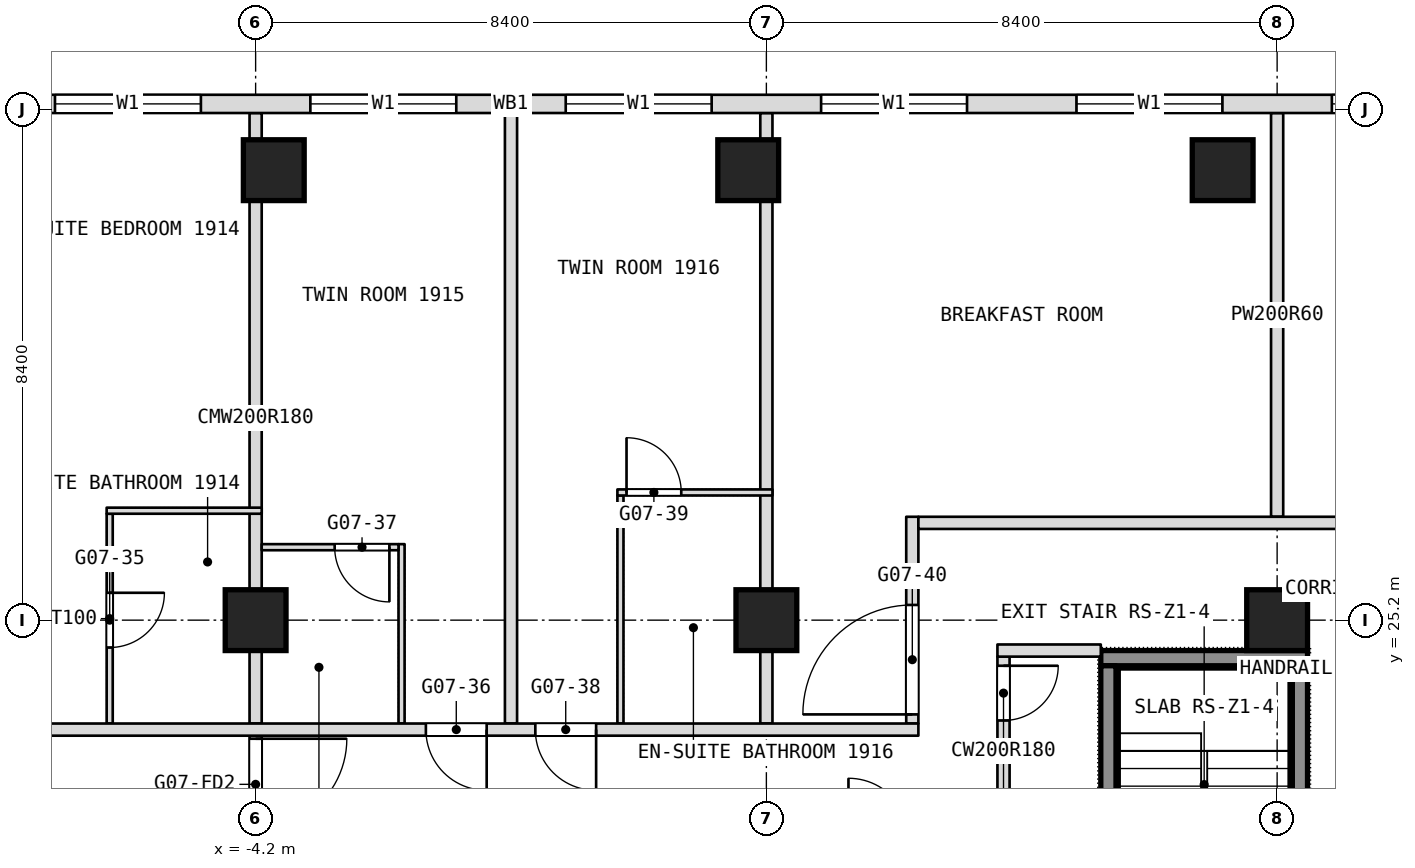
"""IFC4 building model, lengths in metres.
Left out: names, types, materials, properties, quantities, classifications, styles, units other than length and angle.
Written with IfcOpenShell. Run it as: python <this file> out.ifc"""

import sys

from ifc_helpers import new_model, si_unit, direction, frame, frame_2d, origin, origin_2d, place, context, subcontext, project, spatial, rectangle, extrude, element, fill, save


model = new_model("IFC4")
c1 = context("Model", 3, precision=1e-05, world=origin(), true_north=direction((0.0, 1.0)))
c2 = subcontext(c1, "Body", "Model", "MODEL_VIEW")
j1 = project(units=[si_unit("LENGTHUNIT", "METRE"), si_unit("PLANEANGLEUNIT", "RADIAN")], contexts=[c1])
p1 = place(None, origin())
s1 = spatial("IfcSite", under=j1, at=p1, CompositionType="ELEMENT")
p2 = place(p1, origin())
s2 = spatial("IfcBuilding", under=s1, at=p2, CompositionType="ELEMENT")
p3 = place(p2, frame((0.0, 0.0, 83.3)))
s3 = spatial("IfcBuildingStorey", under=s2, at=p3, CompositionType="ELEMENT", Elevation=83.3)
for number, where, z_axis, x_axis in (
    (1, (-4.2, 25.2, 0.0), (0.0, 0.0, 1.0), (1.0, 0.0, 0.0)),
    (2, (4.2, 25.2, 0.0), (0.0, 0.0, 1.0), (1.0, 0.0, 0.0)),
    (3, (12.6, 25.2, 0.0), (0.0, 0.0, 1.0), (1.0, 0.0, 0.0)),
    (4, (-3.901, 32.6, 0.0), (0.0, 0.0, 1.0), (1.0, 0.0, 0.0)),
    (5, (3.901, 32.6, 0.0), (0.0, 0.0, 1.0), (1.0, 0.0, 0.0)),
    (6, (11.704, 32.6, 0.0), (0.0, 0.0, 1.0), (1.0, 0.0, 0.0)),
):
    element("IfcColumn", number, at=place(p3, frame(where, z_axis=z_axis, x_axis=x_axis)), inside=s3, PredefinedType="COLUMN", context=c2, shape_type="SweptSolid", body=[
        extrude(rectangle(XDim=1.0, YDim=1.0, at=origin_2d()), origin(), (0.0, 0.0, 1.0), 3.6),
    ])
p4 = place(p3, frame((12.6, 26.9, 0.0), z_axis=(0.0, 0.0, 1.0), x_axis=(0.0, 1.0, 0.0)))
e7 = element("IfcWall", 7, at=p4, inside=s3, PredefinedType="PARTITIONING", context=c2, shape_type="SweptSolid", body=[
    extrude(rectangle(XDim=6.64, YDim=0.2, at=frame_2d((3.32, 0.0))), origin(), (0.0, 0.0, 1.0), 3.3),
])
p5 = place(p3, frame((8.1, 21.5, 0.0), z_axis=(0.0, 0.0, 1.0), x_axis=(0.0, 1.0, 0.0)))
e8 = element("IfcWall", 8, at=p5, inside=s3, PredefinedType="PARTITIONING", context=c2, shape_type="SweptSolid", body=[
    extrude(rectangle(XDim=3.1, YDim=0.2, at=frame_2d((1.55, 0.0))), origin(), (0.0, 0.0, 1.0), 3.3),
])
p6 = place(p5, frame((2.05, 0.0, 0.0)))
e9 = element("IfcOpeningElement", 9, at=p6, cuts=e8, PredefinedType="OPENING", context=c2, shape_type="SweptSolid", body=[
    extrude(rectangle(XDim=0.9, YDim=2.1, at=frame_2d((0.45, 1.05))), frame((0.0, 0.1, 0.0), z_axis=(0.0, -1.0, 0.0), x_axis=(1.0, 0.0, 0.0)), (0.0, 0.0, 1.0), 0.2),
])
p7 = place(p3, frame((6.6, 23.5, 0.0), z_axis=(0.0, 0.0, 1.0), x_axis=(0.0, 1.0, 0.0)))
e10 = element("IfcWall", 10, at=p7, inside=s3, PredefinedType="PARTITIONING", context=c2, shape_type="SweptSolid", body=[
    extrude(rectangle(XDim=3.4, YDim=0.2, at=frame_2d((1.7, 0.0))), origin(), (0.0, 0.0, 1.0), 3.3),
])
p8 = place(p7, frame((0.15, 0.0, 0.0)))
e11 = element("IfcOpeningElement", 11, at=p8, cuts=e10, PredefinedType="OPENING", context=c2, shape_type="SweptSolid", body=[
    extrude(rectangle(XDim=1.8, YDim=2.1, at=frame_2d((0.9, 1.05))), frame((0.0, 0.1, 0.0), z_axis=(0.0, -1.0, 0.0), x_axis=(1.0, 0.0, 0.0)), (0.0, 0.0, 1.0), 0.2),
])
p9 = place(p3, frame((4.2, 23.5, 0.0), z_axis=(0.0, 0.0, 1.0), x_axis=(0.0, 1.0, 0.0)))
e12 = element("IfcWall", 12, at=p9, inside=s3, PredefinedType="PARTITIONING", context=c2, shape_type="SweptSolid", body=[
    extrude(rectangle(XDim=10.04, YDim=0.2, at=frame_2d((5.02, 0.0))), origin(), (0.0, 0.0, 1.0), 3.3),
])
p10 = place(p3, frame((1.8, 23.5, 0.0), z_axis=(0.0, 0.0, 1.0), x_axis=(0.0, 1.0, 0.0)))
e13 = element("IfcWall", 13, at=p10, inside=s3, PredefinedType="PARTITIONING", context=c2, shape_type="SweptSolid", body=[
    extrude(rectangle(XDim=3.75, YDim=0.1, at=frame_2d((1.875, 0.0))), origin(), (0.0, 0.0, 1.0), 3.3),
])
p11 = place(p3, frame((0.0, 23.5, 0.0), z_axis=(0.0, 0.0, 1.0), x_axis=(0.0, 1.0, 0.0)))
e14 = element("IfcWall", 14, at=p11, inside=s3, PredefinedType="PARTITIONING", context=c2, shape_type="SweptSolid", body=[
    extrude(rectangle(XDim=10.04, YDim=0.2, at=frame_2d((5.02, 0.0))), origin(), (0.0, 0.0, 1.0), 3.3),
])
p12 = place(p3, frame((-1.8, 23.5, 0.0), z_axis=(0.0, 0.0, 1.0), x_axis=(0.0, 1.0, 0.0)))
e15 = element("IfcWall", 15, at=p12, inside=s3, PredefinedType="PARTITIONING", context=c2, shape_type="SweptSolid", body=[
    extrude(rectangle(XDim=2.95, YDim=0.1, at=frame_2d((1.475, 0.0))), origin(), (0.0, 0.0, 1.0), 3.3),
])
p13 = place(p3, frame((-4.2, 16.8, 0.0), z_axis=(0.0, 0.0, 1.0), x_axis=(0.0, 1.0, 0.0)))
e16 = element("IfcWall", 16, at=p13, inside=s3, PredefinedType="PARTITIONING", context=c2, shape_type="SweptSolid", body=[
    extrude(rectangle(XDim=6.7, YDim=0.2, at=frame_2d((3.35, 0.0))), origin(), (0.0, 0.0, 1.0), 3.3),
])
p14 = place(p13, frame((0.15, 0.0, 0.0)))
e17 = element("IfcOpeningElement", 17, at=p14, cuts=e16, PredefinedType="OPENING", context=c2, shape_type="SweptSolid", body=[
    extrude(rectangle(XDim=1.5, YDim=2.1, at=frame_2d((0.75, 1.05))), frame((0.0, 0.1, 0.0), z_axis=(0.0, -1.0, 0.0), x_axis=(1.0, 0.0, 0.0)), (0.0, 0.0, 1.0), 0.2),
])
p15 = place(p13, frame((4.95, 0.0, 0.0)))
e18 = element("IfcOpeningElement", 18, at=p15, cuts=e16, PredefinedType="OPENING", context=c2, shape_type="SweptSolid", body=[
    extrude(rectangle(XDim=1.5, YDim=2.1, at=frame_2d((0.75, 1.05))), frame((0.0, 0.1, 0.0), z_axis=(0.0, -1.0, 0.0), x_axis=(1.0, 0.0, 0.0)), (0.0, 0.0, 1.0), 0.2),
])
p16 = place(p3, frame((-4.2, 23.5, 0.0), z_axis=(0.0, 0.0, 1.0), x_axis=(0.0, 1.0, 0.0)))
e19 = element("IfcWall", 19, at=p16, inside=s3, PredefinedType="PARTITIONING", context=c2, shape_type="SweptSolid", body=[
    extrude(rectangle(XDim=10.04, YDim=0.2, at=frame_2d((5.02, 0.0))), origin(), (0.0, 0.0, 1.0), 3.3),
])
p17 = place(p3, frame((-6.6, 23.5, 0.0), z_axis=(0.0, 0.0, 1.0), x_axis=(0.0, 1.0, 0.0)))
e20 = element("IfcWall", 20, at=p17, inside=s3, PredefinedType="PARTITIONING", context=c2, shape_type="SweptSolid", body=[
    extrude(rectangle(XDim=3.45, YDim=0.1, at=frame_2d((1.725, 0.0))), origin(), (0.0, 0.0, 1.0), 3.3),
])
p18 = place(p17, frame((1.25, 0.0, 0.0)))
e21 = element("IfcOpeningElement", 21, at=p18, cuts=e20, PredefinedType="OPENING", context=c2, shape_type="SweptSolid", body=[
    extrude(rectangle(XDim=0.9, YDim=2.1, at=frame_2d((0.45, 1.05))), frame((0.0, 0.05, 0.0), z_axis=(0.0, -1.0, 0.0), x_axis=(1.0, 0.0, 0.0)), (0.0, 0.0, 1.0), 0.1),
])
p19 = place(p3, frame((-16.7, 23.4, 0.0), z_axis=(0.0, 0.0, 1.0), x_axis=(1.0, 0.0, 0.0)))
e22 = element("IfcWall", 22, at=p19, inside=s3, PredefinedType="PARTITIONING", context=c2, shape_type="SweptSolid", body=[
    extrude(rectangle(XDim=23.4, YDim=0.2, at=frame_2d((11.7, 0.0))), origin(), (0.0, 0.0, 1.0), 3.3),
])
p20 = place(p19, frame((2.4, 0.0, 0.0)))
e23 = element("IfcOpeningElement", 23, at=p20, cuts=e22, PredefinedType="OPENING", context=c2, shape_type="SweptSolid", body=[
    extrude(rectangle(XDim=0.9, YDim=2.1, at=frame_2d((0.45, 1.05))), frame((0.0, 0.1, 0.0), z_axis=(0.0, -1.0, 0.0), x_axis=(1.0, 0.0, 0.0)), (0.0, 0.0, 1.0), 0.2),
])
p21 = place(p19, frame((5.65, 0.0, 0.0)))
e24 = element("IfcOpeningElement", 24, at=p21, cuts=e22, PredefinedType="OPENING", context=c2, shape_type="SweptSolid", body=[
    extrude(rectangle(XDim=1.1, YDim=2.1, at=frame_2d((0.55, 1.05))), frame((0.0, 0.1, 0.0), z_axis=(0.0, -1.0, 0.0), x_axis=(1.0, 0.0, 0.0)), (0.0, 0.0, 1.0), 0.2),
])
p22 = place(p19, frame((15.3, 0.0, 0.0)))
e25 = element("IfcOpeningElement", 25, at=p22, cuts=e22, PredefinedType="OPENING", context=c2, shape_type="SweptSolid", body=[
    extrude(rectangle(XDim=1.0, YDim=2.1, at=frame_2d((0.5, 1.05))), frame((0.0, 0.1, 0.0), z_axis=(0.0, -1.0, 0.0), x_axis=(1.0, 0.0, 0.0)), (0.0, 0.0, 1.0), 0.2),
])
p23 = place(p19, frame((17.1, 0.0, 0.0)))
e26 = element("IfcOpeningElement", 26, at=p23, cuts=e22, PredefinedType="OPENING", context=c2, shape_type="SweptSolid", body=[
    extrude(rectangle(XDim=1.0, YDim=2.1, at=frame_2d((0.5, 1.05))), frame((0.0, 0.1, 0.0), z_axis=(0.0, -1.0, 0.0), x_axis=(1.0, 0.0, 0.0)), (0.0, 0.0, 1.0), 0.2),
])
p24 = place(p3, frame((8.0, 24.7, 0.0), z_axis=(0.0, 0.0, 1.0), x_axis=(1.0, 0.0, 0.0)))
e27 = element("IfcWall", 27, at=p24, inside=s3, PredefinedType="PARTITIONING", context=c2, shape_type="SweptSolid", body=[
    extrude(rectangle(XDim=1.7, YDim=0.2, at=frame_2d((0.85, 0.0))), origin(), (0.0, 0.0, 1.0), 3.3),
])
p25 = place(p3, frame((-4.1, 26.4, 0.0), z_axis=(0.0, 0.0, 1.0), x_axis=(1.0, 0.0, 0.0)))
e28 = element("IfcWall", 28, at=p25, inside=s3, PredefinedType="PARTITIONING", context=c2, shape_type="SweptSolid", body=[
    extrude(rectangle(XDim=2.25, YDim=0.1, at=frame_2d((1.125, 0.0))), origin(), (0.0, 0.0, 1.0), 3.3),
])
p26 = place(p25, frame((1.2, 0.0, 0.0)))
e29 = element("IfcOpeningElement", 29, at=p26, cuts=e28, PredefinedType="OPENING", context=c2, shape_type="SweptSolid", body=[
    extrude(rectangle(XDim=0.9, YDim=2.1, at=frame_2d((0.45, 1.05))), frame((0.0, 0.05, 0.0), z_axis=(0.0, -1.0, 0.0), x_axis=(1.0, 0.0, 0.0)), (0.0, 0.0, 1.0), 0.1),
])
p27 = place(p3, frame((6.7, 26.8, 0.0), z_axis=(0.0, 0.0, 1.0), x_axis=(1.0, 0.0, 0.0)))
e30 = element("IfcWall", 30, at=p27, inside=s3, PredefinedType="PARTITIONING", context=c2, shape_type="SweptSolid", body=[
    extrude(rectangle(XDim=8.0, YDim=0.2, at=frame_2d((4.0, 0.0))), origin(), (0.0, 0.0, 1.0), 3.3),
])
p28 = place(p3, frame((-6.65, 27.0, 0.0), z_axis=(0.0, 0.0, 1.0), x_axis=(1.0, 0.0, 0.0)))
e31 = element("IfcWall", 31, at=p28, inside=s3, PredefinedType="PARTITIONING", context=c2, shape_type="SweptSolid", body=[
    extrude(rectangle(XDim=2.55, YDim=0.1, at=frame_2d((1.275, 0.0))), origin(), (0.0, 0.0, 1.0), 3.3),
])
p29 = place(p3, frame((1.75, 27.3, 0.0), z_axis=(0.0, 0.0, 1.0), x_axis=(1.0, 0.0, 0.0)))
e32 = element("IfcWall", 32, at=p29, inside=s3, PredefinedType="PARTITIONING", context=c2, shape_type="SweptSolid", body=[
    extrude(rectangle(XDim=2.55, YDim=0.1, at=frame_2d((1.275, 0.0))), origin(), (0.0, 0.0, 1.0), 3.3),
])
p30 = place(p29, frame((0.15, 0.0, 0.0)))
e33 = element("IfcOpeningElement", 33, at=p30, cuts=e32, PredefinedType="OPENING", context=c2, shape_type="SweptSolid", body=[
    extrude(rectangle(XDim=0.9, YDim=2.1, at=frame_2d((0.45, 1.05))), frame((0.0, 0.05, 0.0), z_axis=(0.0, -1.0, 0.0), x_axis=(1.0, 0.0, 0.0)), (0.0, 0.0, 1.0), 0.1),
])
p31 = place(p3, frame((23.406, 33.69, 0.0), z_axis=(0.0, 0.0, 1.0), x_axis=(-1.0, 0.0, 0.0)))
e34 = element("IfcWall", 34, at=p31, inside=s3, PredefinedType="NOTDEFINED", context=c2, shape_type="SweptSolid", body=[
    extrude(rectangle(XDim=46.812, YDim=0.3, at=frame_2d((23.406, 0.0))), origin(), (0.0, 0.0, 1.0), 3.6),
])
p32 = place(p31, frame((2.186, 0.0, 0.9)))
e35 = element("IfcOpeningElement", 35, at=p32, cuts=e34, PredefinedType="OPENING", context=c2, shape_type="SweptSolid", body=[
    extrude(rectangle(XDim=2.4, YDim=2.1, at=frame_2d((1.2, 1.05))), frame((0.0, 0.15, 0.0), z_axis=(0.0, -1.0, 0.0), x_axis=(1.0, 0.0, 0.0)), (0.0, 0.0, 1.0), 0.3),
])
p33 = place(p31, frame((7.506, 0.0, 0.9)))
e36 = element("IfcOpeningElement", 36, at=p33, cuts=e34, PredefinedType="OPENING", context=c2, shape_type="SweptSolid", body=[
    extrude(rectangle(XDim=2.4, YDim=2.1, at=frame_2d((1.2, 1.05))), frame((0.0, 0.15, 0.0), z_axis=(0.0, -1.0, 0.0), x_axis=(1.0, 0.0, 0.0)), (0.0, 0.0, 1.0), 0.3),
])
p34 = place(p31, frame((11.706, 0.0, 0.9)))
e37 = element("IfcOpeningElement", 37, at=p34, cuts=e34, PredefinedType="OPENING", context=c2, shape_type="SweptSolid", body=[
    extrude(rectangle(XDim=2.4, YDim=2.1, at=frame_2d((1.2, 1.05))), frame((0.0, 0.15, 0.0), z_axis=(0.0, -1.0, 0.0), x_axis=(1.0, 0.0, 0.0)), (0.0, 0.0, 1.0), 0.3),
])
p35 = place(p31, frame((15.906, 0.0, 0.9)))
e38 = element("IfcOpeningElement", 38, at=p35, cuts=e34, PredefinedType="OPENING", context=c2, shape_type="SweptSolid", body=[
    extrude(rectangle(XDim=2.4, YDim=2.1, at=frame_2d((1.2, 1.05))), frame((0.0, 0.15, 0.0), z_axis=(0.0, -1.0, 0.0), x_axis=(1.0, 0.0, 0.0)), (0.0, 0.0, 1.0), 0.3),
])
p36 = place(p31, frame((20.106, 0.0, 0.9)))
e39 = element("IfcOpeningElement", 39, at=p36, cuts=e34, PredefinedType="OPENING", context=c2, shape_type="SweptSolid", body=[
    extrude(rectangle(XDim=2.4, YDim=2.1, at=frame_2d((1.2, 1.05))), frame((0.0, 0.15, 0.0), z_axis=(0.0, -1.0, 0.0), x_axis=(1.0, 0.0, 0.0)), (0.0, 0.0, 1.0), 0.3),
])
p37 = place(p31, frame((24.306, 0.0, 0.9)))
e40 = element("IfcOpeningElement", 40, at=p37, cuts=e34, PredefinedType="OPENING", context=c2, shape_type="SweptSolid", body=[
    extrude(rectangle(XDim=2.4, YDim=2.1, at=frame_2d((1.2, 1.05))), frame((0.0, 0.15, 0.0), z_axis=(0.0, -1.0, 0.0), x_axis=(1.0, 0.0, 0.0)), (0.0, 0.0, 1.0), 0.3),
])
p38 = place(p31, frame((28.506, 0.0, 0.9)))
e41 = element("IfcOpeningElement", 41, at=p38, cuts=e34, PredefinedType="OPENING", context=c2, shape_type="SweptSolid", body=[
    extrude(rectangle(XDim=2.4, YDim=2.1, at=frame_2d((1.2, 1.05))), frame((0.0, 0.15, 0.0), z_axis=(0.0, -1.0, 0.0), x_axis=(1.0, 0.0, 0.0)), (0.0, 0.0, 1.0), 0.3),
])
p39 = place(p31, frame((32.706, 0.0, 0.9)))
e42 = element("IfcOpeningElement", 42, at=p39, cuts=e34, PredefinedType="OPENING", context=c2, shape_type="SweptSolid", body=[
    extrude(rectangle(XDim=2.4, YDim=2.1, at=frame_2d((1.2, 1.05))), frame((0.0, 0.15, 0.0), z_axis=(0.0, -1.0, 0.0), x_axis=(1.0, 0.0, 0.0)), (0.0, 0.0, 1.0), 0.3),
])
p40 = place(p31, frame((36.906, 0.0, 0.9)))
e43 = element("IfcOpeningElement", 43, at=p40, cuts=e34, PredefinedType="OPENING", context=c2, shape_type="SweptSolid", body=[
    extrude(rectangle(XDim=2.4, YDim=2.1, at=frame_2d((1.2, 1.05))), frame((0.0, 0.15, 0.0), z_axis=(0.0, -1.0, 0.0), x_axis=(1.0, 0.0, 0.0)), (0.0, 0.0, 1.0), 0.3),
])
p41 = place(p31, frame((42.226, 0.0, 0.9)))
e44 = element("IfcOpeningElement", 44, at=p41, cuts=e34, PredefinedType="OPENING", context=c2, shape_type="SweptSolid", body=[
    extrude(rectangle(XDim=2.4, YDim=2.1, at=frame_2d((1.2, 1.05))), frame((0.0, 0.15, 0.0), z_axis=(0.0, -1.0, 0.0), x_axis=(1.0, 0.0, 0.0)), (0.0, 0.0, 1.0), 0.3),
])
p42 = place(p3, frame((9.7, 24.575, 0.1), z_axis=(0.0, 0.0, 1.0), x_axis=(1.0, 0.0, 0.0)))
e45 = element("IfcWall", 45, at=p42, inside=s3, PredefinedType="SHEAR", context=c2, shape_type="SweptSolid", body=[
    extrude(rectangle(XDim=3.4, YDim=0.25, at=frame_2d((1.7, 0.0))), origin(), (0.0, 0.0, 1.0), 3.6),
])
p43 = place(p3, frame((9.825, 18.75, 0.1), z_axis=(0.0, 0.0, 1.0), x_axis=(0.0, 1.0, 0.0)))
e46 = element("IfcWall", 46, at=p43, inside=s3, PredefinedType="SHEAR", context=c2, shape_type="SweptSolid", body=[
    extrude(rectangle(XDim=5.7, YDim=0.25, at=frame_2d((2.85, 0.0))), origin(), (0.0, 0.0, 1.0), 3.6),
])
p44 = place(p43, frame((0.2, 0.0, 0.0)))
e47 = element("IfcOpeningElement", 47, at=p44, cuts=e46, PredefinedType="OPENING", context=c2, shape_type="SweptSolid", body=[
    extrude(rectangle(XDim=1.0, YDim=2.1, at=frame_2d((0.5, 1.05))), frame((0.0, 0.125, 0.0), z_axis=(0.0, -1.0, 0.0), x_axis=(1.0, 0.0, 0.0)), (0.0, 0.0, 1.0), 0.25),
])
p45 = place(p3, frame((12.975, 18.75, 0.1), z_axis=(0.0, 0.0, 1.0), x_axis=(0.0, 1.0, 0.0)))
e48 = element("IfcWall", 48, at=p45, inside=s3, PredefinedType="SHEAR", context=c2, shape_type="SweptSolid", body=[
    extrude(rectangle(XDim=5.7, YDim=0.25, at=frame_2d((2.85, 0.0))), origin(), (0.0, 0.0, 1.0), 3.6),
])
p46 = place(p6, origin())
e49 = element("IfcDoor", 49, at=p46, inside=s3, OperationType="SINGLE_SWING_LEFT", PredefinedType="DOOR", context=c2, shape_type="SweptSolid", body=[
    extrude(rectangle(XDim=0.9, YDim=2.1, at=frame_2d((0.45, 1.05))), frame((0.0, 0.025, 0.0), z_axis=(0.0, -1.0, 0.0), x_axis=(1.0, 0.0, 0.0)), (0.0, 0.0, 1.0), 0.05),
])
fill(e9, e49)
p47 = place(p8, origin())
e50 = element("IfcDoor", 50, at=p47, inside=s3, OperationType="DOUBLE_DOOR_SINGLE_SWING", PredefinedType="DOOR", context=c2, shape_type="SweptSolid", body=[
    extrude(rectangle(XDim=1.8, YDim=2.1, at=frame_2d((0.9, 1.05))), frame((0.0, 0.025, 0.0), z_axis=(0.0, -1.0, 0.0), x_axis=(1.0, 0.0, 0.0)), (0.0, 0.0, 1.0), 0.05),
])
fill(e11, e50)
p48 = place(p18, origin())
e51 = element("IfcDoor", 51, at=p48, inside=s3, OperationType="SINGLE_SWING_RIGHT", PredefinedType="DOOR", context=c2, shape_type="SweptSolid", body=[
    extrude(rectangle(XDim=0.9, YDim=2.1, at=frame_2d((0.45, 1.05))), frame((0.0, 0.025, 0.0), z_axis=(0.0, -1.0, 0.0), x_axis=(1.0, 0.0, 0.0)), (0.0, 0.0, 1.0), 0.05),
])
fill(e21, e51)
p49 = place(p22, origin())
e52 = element("IfcDoor", 52, at=p49, inside=s3, OperationType="SINGLE_SWING_LEFT", PredefinedType="DOOR", context=c2, shape_type="SweptSolid", body=[
    extrude(rectangle(XDim=1.0, YDim=2.1, at=frame_2d((0.5, 1.05))), frame((0.0, 0.025, 0.0), z_axis=(0.0, -1.0, 0.0), x_axis=(1.0, 0.0, 0.0)), (0.0, 0.0, 1.0), 0.05),
])
fill(e25, e52)
p50 = place(p23, origin())
e53 = element("IfcDoor", 53, at=p50, inside=s3, OperationType="SINGLE_SWING_LEFT", PredefinedType="DOOR", context=c2, shape_type="SweptSolid", body=[
    extrude(rectangle(XDim=1.0, YDim=2.1, at=frame_2d((0.5, 1.05))), frame((0.0, 0.025, 0.0), z_axis=(0.0, -1.0, 0.0), x_axis=(1.0, 0.0, 0.0)), (0.0, 0.0, 1.0), 0.05),
])
fill(e26, e53)
p51 = place(p26, origin())
e54 = element("IfcDoor", 54, at=p51, inside=s3, OperationType="SINGLE_SWING_LEFT", PredefinedType="DOOR", context=c2, shape_type="SweptSolid", body=[
    extrude(rectangle(XDim=0.9, YDim=2.1, at=frame_2d((0.45, 1.05))), frame((0.0, 0.025, 0.0), z_axis=(0.0, -1.0, 0.0), x_axis=(1.0, 0.0, 0.0)), (0.0, 0.0, 1.0), 0.05),
])
fill(e29, e54)
p52 = place(p30, origin())
e55 = element("IfcDoor", 55, at=p52, inside=s3, OperationType="SINGLE_SWING_RIGHT", PredefinedType="DOOR", context=c2, shape_type="SweptSolid", body=[
    extrude(rectangle(XDim=0.9, YDim=2.1, at=frame_2d((0.45, 1.05))), frame((0.0, 0.025, 0.0), z_axis=(0.0, -1.0, 0.0), x_axis=(1.0, 0.0, 0.0)), (0.0, 0.0, 1.0), 0.05),
])
fill(e33, e55)
p53 = place(p33, origin())
e56 = element("IfcWindow", 56, at=p53, inside=s3, PartitioningType="SINGLE_PANEL", PredefinedType="WINDOW", context=c2, shape_type="SweptSolid", body=[
    extrude(rectangle(XDim=2.4, YDim=2.1, at=frame_2d((1.2, 1.05))), frame((0.0, 0.03, 0.0), z_axis=(0.0, -1.0, 0.0), x_axis=(1.0, 0.0, 0.0)), (0.0, 0.0, 1.0), 0.06),
])
fill(e36, e56)
p54 = place(p34, origin())
e57 = element("IfcWindow", 57, at=p54, inside=s3, PartitioningType="SINGLE_PANEL", PredefinedType="WINDOW", context=c2, shape_type="SweptSolid", body=[
    extrude(rectangle(XDim=2.4, YDim=2.1, at=frame_2d((1.2, 1.05))), frame((0.0, 0.03, 0.0), z_axis=(0.0, -1.0, 0.0), x_axis=(1.0, 0.0, 0.0)), (0.0, 0.0, 1.0), 0.06),
])
fill(e37, e57)
p55 = place(p35, origin())
e58 = element("IfcWindow", 58, at=p55, inside=s3, PartitioningType="SINGLE_PANEL", PredefinedType="WINDOW", context=c2, shape_type="SweptSolid", body=[
    extrude(rectangle(XDim=2.4, YDim=2.1, at=frame_2d((1.2, 1.05))), frame((0.0, 0.03, 0.0), z_axis=(0.0, -1.0, 0.0), x_axis=(1.0, 0.0, 0.0)), (0.0, 0.0, 1.0), 0.06),
])
fill(e38, e58)
p56 = place(p36, origin())
e59 = element("IfcWindow", 59, at=p56, inside=s3, PartitioningType="SINGLE_PANEL", PredefinedType="WINDOW", context=c2, shape_type="SweptSolid", body=[
    extrude(rectangle(XDim=2.4, YDim=2.1, at=frame_2d((1.2, 1.05))), frame((0.0, 0.03, 0.0), z_axis=(0.0, -1.0, 0.0), x_axis=(1.0, 0.0, 0.0)), (0.0, 0.0, 1.0), 0.06),
])
fill(e39, e59)
p57 = place(p37, origin())
e60 = element("IfcWindow", 60, at=p57, inside=s3, PartitioningType="SINGLE_PANEL", PredefinedType="WINDOW", context=c2, shape_type="SweptSolid", body=[
    extrude(rectangle(XDim=2.4, YDim=2.1, at=frame_2d((1.2, 1.05))), frame((0.0, 0.03, 0.0), z_axis=(0.0, -1.0, 0.0), x_axis=(1.0, 0.0, 0.0)), (0.0, 0.0, 1.0), 0.06),
])
fill(e40, e60)
p58 = place(p38, origin())
e61 = element("IfcWindow", 61, at=p58, inside=s3, PartitioningType="SINGLE_PANEL", PredefinedType="WINDOW", context=c2, shape_type="SweptSolid", body=[
    extrude(rectangle(XDim=2.4, YDim=2.1, at=frame_2d((1.2, 1.05))), frame((0.0, 0.03, 0.0), z_axis=(0.0, -1.0, 0.0), x_axis=(1.0, 0.0, 0.0)), (0.0, 0.0, 1.0), 0.06),
])
fill(e41, e61)
p59 = place(p15, origin())
e62 = element("IfcDoor", 62, at=p59, inside=s3, OperationType="DOUBLE_DOOR_DOUBLE_SWING", PredefinedType="DOOR", context=c2, shape_type="SweptSolid", body=[
    extrude(rectangle(XDim=1.5, YDim=2.1, at=frame_2d((0.75, 1.05))), frame((0.0, 0.025, 0.0), z_axis=(0.0, -1.0, 0.0), x_axis=(1.0, 0.0, 0.0)), (0.0, 0.0, 1.0), 0.05),
])
fill(e18, e62)
save(model, sys.argv[1])
